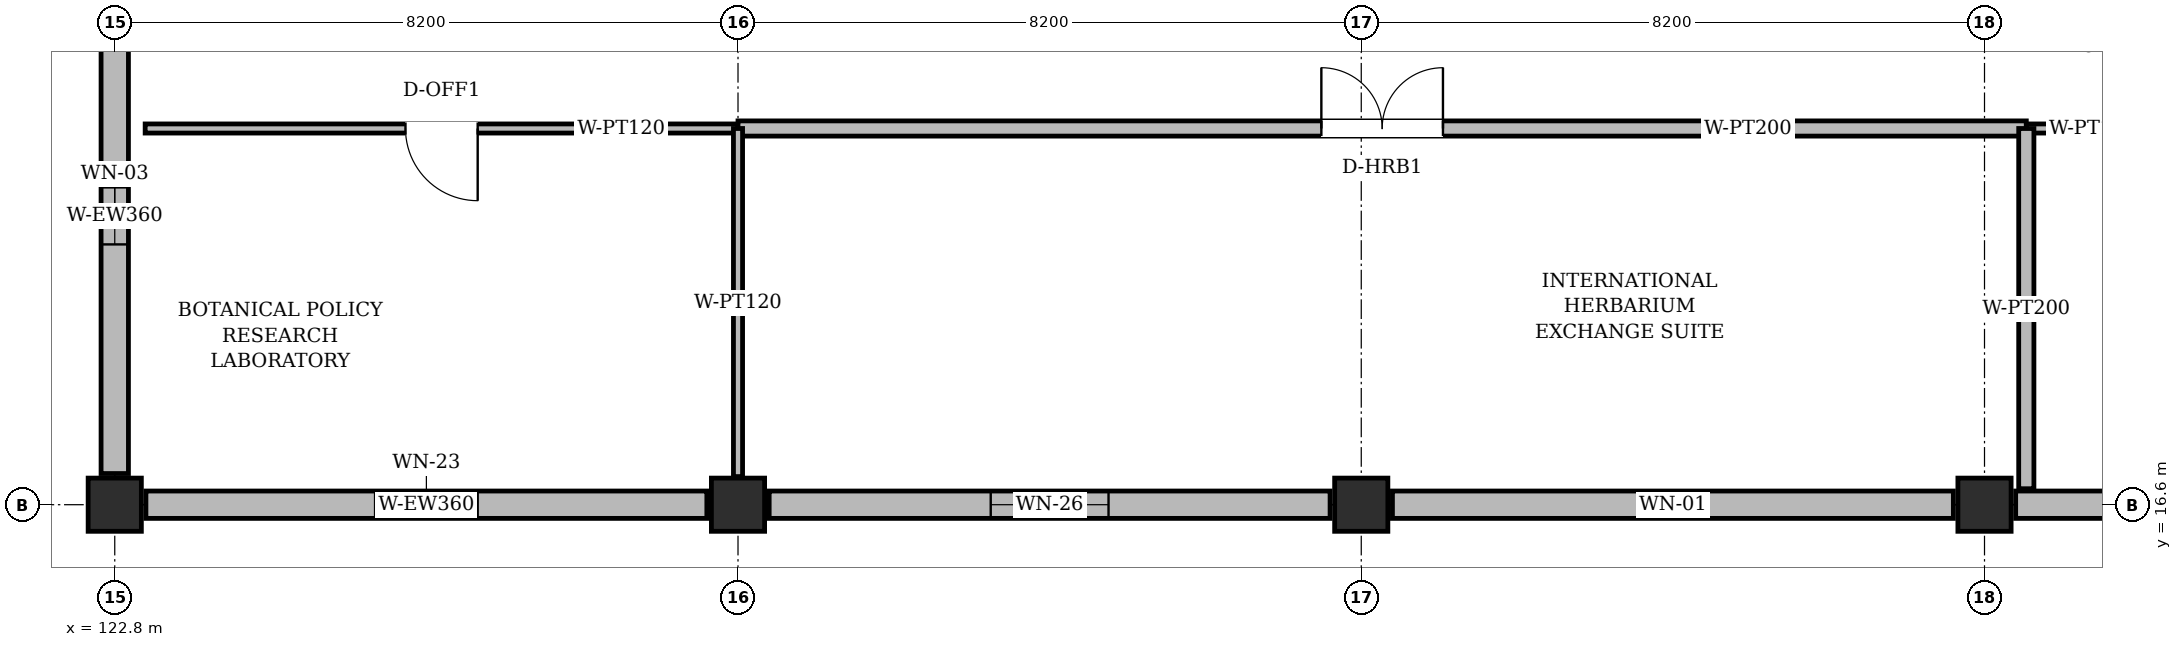
"""IFC4 building model, lengths in metres.
Left out: names, types, materials, properties, quantities, classifications, styles, units other than length and angle.
Written with IfcOpenShell. Run it as: python <this file> out.ifc"""

import sys

from ifc_helpers import new_model, si_unit, direction, frame, frame_2d, origin, origin_2d, place, context, subcontext, project, spatial, rectangle, extrude, element, fill, save


model = new_model("IFC4")
c1 = context("Model", 3, precision=1e-05, world=origin(), true_north=direction((0.0, 1.0)))
c2 = subcontext(c1, "Body", "Model", "MODEL_VIEW")
j1 = project(units=[si_unit("LENGTHUNIT", "METRE"), si_unit("PLANEANGLEUNIT", "RADIAN")], contexts=[c1])
p1 = place(None, origin())
s1 = spatial("IfcSite", under=j1, at=p1, CompositionType="ELEMENT")
p2 = place(p1, origin())
s2 = spatial("IfcBuilding", under=s1, at=p2, CompositionType="ELEMENT")
p3 = place(p2, frame((0.0, 0.0, 61.8)))
s3 = spatial("IfcBuildingStorey", under=s2, at=p3, CompositionType="ELEMENT", Elevation=61.8)
for number, where, z_axis, x_axis in (
    (1, (122.8, 16.6, 0.0), (0.0, 0.0, 1.0), (1.0, 0.0, 0.0)),
    (2, (131.0, 16.6, 0.0), (0.0, 0.0, 1.0), (1.0, 0.0, 0.0)),
    (3, (139.2, 16.6, 0.0), (0.0, 0.0, 1.0), (1.0, 0.0, 0.0)),
    (4, (147.4, 16.6, 0.0), (0.0, 0.0, 1.0), (1.0, 0.0, 0.0)),
):
    element("IfcColumn", number, at=place(p3, frame(where, z_axis=z_axis, x_axis=x_axis)), inside=s3, PredefinedType="COLUMN", context=c2, shape_type="SweptSolid", body=[
        extrude(rectangle(XDim=0.7, YDim=0.7, at=origin_2d()), origin(), (0.0, 0.0, 1.0), 4.145),
    ])
p4 = place(p3, frame((123.21, 16.6, 0.0), z_axis=(0.0, 0.0, 1.0), x_axis=(1.0, 0.0, 0.0)))
e5 = element("IfcWall", 5, at=p4, inside=s3, PredefinedType="SOLIDWALL", context=c2, shape_type="SweptSolid", body=[
    extrude(rectangle(XDim=7.38, YDim=0.36, at=frame_2d((3.69, 0.0))), origin(), (0.0, 0.0, 1.0), 3.53),
])
p5 = place(p4, frame((3.015, 0.0, 0.95)))
e6 = element("IfcOpeningElement", 6, at=p5, cuts=e5, PredefinedType="OPENING", context=c2, shape_type="SweptSolid", body=[
    extrude(rectangle(XDim=1.35, YDim=1.75, at=frame_2d((0.675, 0.875))), frame((0.0, 0.192, 0.0), z_axis=(0.0, -1.0, 0.0), x_axis=(1.0, 0.0, 0.0)), (0.0, 0.0, 1.0), 0.384),
])
p6 = place(p3, frame((131.41, 16.6, 0.0), z_axis=(0.0, 0.0, 1.0), x_axis=(1.0, 0.0, 0.0)))
e7 = element("IfcWall", 7, at=p6, inside=s3, PredefinedType="SOLIDWALL", context=c2, shape_type="SweptSolid", body=[
    extrude(rectangle(XDim=7.38, YDim=0.36, at=frame_2d((3.69, 0.0))), origin(), (0.0, 0.0, 1.0), 3.53),
])
p7 = place(p6, frame((2.915, 0.0, 0.95)))
e8 = element("IfcOpeningElement", 8, at=p7, cuts=e7, PredefinedType="OPENING", context=c2, shape_type="SweptSolid", body=[
    extrude(rectangle(XDim=1.55, YDim=1.5, at=frame_2d((0.775, 0.75))), frame((0.0, 0.192, 0.0), z_axis=(0.0, -1.0, 0.0), x_axis=(1.0, 0.0, 0.0)), (0.0, 0.0, 1.0), 0.384),
])
p8 = place(p3, frame((139.61, 16.6, 0.0), z_axis=(0.0, 0.0, 1.0), x_axis=(1.0, 0.0, 0.0)))
e9 = element("IfcWall", 9, at=p8, inside=s3, PredefinedType="SOLIDWALL", context=c2, shape_type="SweptSolid", body=[
    extrude(rectangle(XDim=7.38, YDim=0.36, at=frame_2d((3.69, 0.0))), origin(), (0.0, 0.0, 1.0), 3.53),
])
p9 = place(p8, frame((3.24, 0.0, 0.95)))
e10 = element("IfcOpeningElement", 10, at=p9, cuts=e9, PredefinedType="OPENING", context=c2, shape_type="SweptSolid", body=[
    extrude(rectangle(XDim=0.9, YDim=2.1, at=frame_2d((0.45, 1.05))), frame((0.0, 0.192, 0.0), z_axis=(0.0, -1.0, 0.0), x_axis=(1.0, 0.0, 0.0)), (0.0, 0.0, 1.0), 0.384),
])
p10 = place(p3, frame((147.81, 16.6, 0.0), z_axis=(0.0, 0.0, 1.0), x_axis=(1.0, 0.0, 0.0)))
e11 = element("IfcWall", 11, at=p10, inside=s3, PredefinedType="SOLIDWALL", context=c2, shape_type="SweptSolid", body=[
    extrude(rectangle(XDim=7.38, YDim=0.36, at=frame_2d((3.69, 0.0))), origin(), (0.0, 0.0, 1.0), 3.53),
])
p11 = place(p10, frame((2.865, 0.0, 0.95)))
e12 = element("IfcOpeningElement", 12, at=p11, cuts=e11, PredefinedType="OPENING", context=c2, shape_type="SweptSolid", body=[
    extrude(rectangle(XDim=1.65, YDim=2.0, at=frame_2d((0.825, 1.0))), frame((0.0, 0.192, 0.0), z_axis=(0.0, -1.0, 0.0), x_axis=(1.0, 0.0, 0.0)), (0.0, 0.0, 1.0), 0.384),
])
p12 = place(p3, frame((122.8, 23.79, 0.0), z_axis=(0.0, 0.0, 1.0), x_axis=(0.0, -1.0, 0.0)))
e13 = element("IfcWall", 13, at=p12, inside=s3, PredefinedType="SOLIDWALL", context=c2, shape_type="SweptSolid", body=[
    extrude(rectangle(XDim=6.78, YDim=0.36, at=frame_2d((3.39, 0.0))), origin(), (0.0, 0.0, 1.0), 3.53),
])
p13 = place(p12, frame((3.015, 0.0, 0.95)))
e14 = element("IfcOpeningElement", 14, at=p13, cuts=e13, PredefinedType="OPENING", context=c2, shape_type="SweptSolid", body=[
    extrude(rectangle(XDim=0.75, YDim=1.8, at=frame_2d((0.375, 0.9))), frame((0.0, 0.192, 0.0), z_axis=(0.0, -1.0, 0.0), x_axis=(1.0, 0.0, 0.0)), (0.0, 0.0, 1.0), 0.384),
])
p14 = place(p3, frame((131.0, 21.55, 0.0), z_axis=(0.0, 0.0, 1.0), x_axis=(-1.0, 0.0, 0.0)))
e15 = element("IfcWall", 15, at=p14, inside=s3, PredefinedType="PARTITIONING", context=c2, shape_type="SweptSolid", body=[
    extrude(rectangle(XDim=7.8, YDim=0.12, at=frame_2d((3.9, 0.0))), origin(), (0.0, 0.0, 1.0), 4.005),
])
p15 = place(p14, frame((3.425, 0.0, 0.0)))
e16 = element("IfcOpeningElement", 16, at=p15, cuts=e15, PredefinedType="OPENING", context=c2, shape_type="SweptSolid", body=[
    extrude(rectangle(XDim=0.95, YDim=2.2, at=frame_2d((0.475, 1.1))), frame((0.0, 0.072, 0.0), z_axis=(0.0, -1.0, 0.0), x_axis=(1.0, 0.0, 0.0)), (0.0, 0.0, 1.0), 0.144),
])
p16 = place(p3, frame((147.95, 21.55, 0.0), z_axis=(0.0, 0.0, 1.0), x_axis=(-1.0, 0.0, 0.0)))
e17 = element("IfcWall", 17, at=p16, inside=s3, PredefinedType="PARTITIONING", context=c2, shape_type="SweptSolid", body=[
    extrude(rectangle(XDim=16.95, YDim=0.2, at=frame_2d((8.475, 0.0))), origin(), (0.0, 0.0, 1.0), 3.685),
])
p17 = place(p16, frame((7.675, 0.0, 0.0)))
e18 = element("IfcOpeningElement", 18, at=p17, cuts=e17, PredefinedType="OPENING", context=c2, shape_type="SweptSolid", body=[
    extrude(rectangle(XDim=1.6, YDim=2.3, at=frame_2d((0.8, 1.15))), frame((0.0, 0.112, 0.0), z_axis=(0.0, -1.0, 0.0), x_axis=(1.0, 0.0, 0.0)), (0.0, 0.0, 1.0), 0.224),
])
p18 = place(p3, frame((149.7, 21.55, 0.0), z_axis=(0.0, 0.0, 1.0), x_axis=(-1.0, 0.0, 0.0)))
e19 = element("IfcWall", 19, at=p18, inside=s3, PredefinedType="PARTITIONING", context=c2, shape_type="SweptSolid", body=[
    extrude(rectangle(XDim=1.75, YDim=0.12, at=frame_2d((0.875, 0.0))), origin(), (0.0, 0.0, 1.0), 3.685),
])
p19 = place(p3, frame((131.0, 21.55, 0.0), z_axis=(0.0, 0.0, 1.0), x_axis=(0.0, -1.0, 0.0)))
e20 = element("IfcWall", 20, at=p19, inside=s3, PredefinedType="PARTITIONING", context=c2, shape_type="SweptSolid", body=[
    extrude(rectangle(XDim=4.58, YDim=0.12, at=frame_2d((2.29, 0.0))), origin(), (0.0, 0.0, 1.0), 3.53),
])
p20 = place(p3, frame((147.95, 21.55, 0.0), z_axis=(0.0, 0.0, 1.0), x_axis=(0.0, -1.0, 0.0)))
e21 = element("IfcWall", 21, at=p20, inside=s3, PredefinedType="PARTITIONING", context=c2, shape_type="SweptSolid", body=[
    extrude(rectangle(XDim=4.74, YDim=0.2, at=frame_2d((2.37, 0.0))), origin(), (0.0, 0.0, 1.0), 4.005),
])
p21 = place(p5, origin())
e22 = element("IfcWindow", 22, at=p21, inside=s3, PartitioningType="SINGLE_PANEL", PredefinedType="WINDOW", context=c2, shape_type="SweptSolid", body=[
    extrude(rectangle(XDim=1.35, YDim=1.75, at=frame_2d((0.675, 0.875))), frame((0.0, 0.03, 0.0), z_axis=(0.0, -1.0, 0.0), x_axis=(1.0, 0.0, 0.0)), (0.0, 0.0, 1.0), 0.06),
])
fill(e6, e22)
p22 = place(p7, origin())
e23 = element("IfcWindow", 23, at=p22, inside=s3, PartitioningType="DOUBLE_PANEL_VERTICAL", PredefinedType="WINDOW", context=c2, shape_type="SweptSolid", body=[
    extrude(rectangle(XDim=1.55, YDim=1.5, at=frame_2d((0.775, 0.75))), frame((0.0, 0.03, 0.0), z_axis=(0.0, -1.0, 0.0), x_axis=(1.0, 0.0, 0.0)), (0.0, 0.0, 1.0), 0.06),
])
fill(e8, e23)
p23 = place(p9, origin())
e24 = element("IfcWindow", 24, at=p23, inside=s3, PartitioningType="SINGLE_PANEL", PredefinedType="WINDOW", context=c2, shape_type="SweptSolid", body=[
    extrude(rectangle(XDim=0.9, YDim=2.1, at=frame_2d((0.45, 1.05))), frame((0.0, 0.03, 0.0), z_axis=(0.0, -1.0, 0.0), x_axis=(1.0, 0.0, 0.0)), (0.0, 0.0, 1.0), 0.06),
])
fill(e10, e24)
p24 = place(p13, origin())
e25 = element("IfcWindow", 25, at=p24, inside=s3, PartitioningType="SINGLE_PANEL", PredefinedType="WINDOW", context=c2, shape_type="SweptSolid", body=[
    extrude(rectangle(XDim=0.75, YDim=1.8, at=frame_2d((0.375, 0.9))), frame((0.0, 0.03, 0.0), z_axis=(0.0, -1.0, 0.0), x_axis=(1.0, 0.0, 0.0)), (0.0, 0.0, 1.0), 0.06),
])
fill(e14, e25)
p25 = place(p15, origin())
e26 = element("IfcDoor", 26, at=p25, inside=s3, OperationType="SINGLE_SWING_LEFT", PredefinedType="DOOR", context=c2, shape_type="SweptSolid", body=[
    extrude(rectangle(XDim=0.95, YDim=2.2, at=frame_2d((0.475, 1.1))), frame((0.0, 0.025, 0.0), z_axis=(0.0, -1.0, 0.0), x_axis=(1.0, 0.0, 0.0)), (0.0, 0.0, 1.0), 0.05),
])
fill(e16, e26)
p26 = place(p17, frame((1.6, 0.0, 0.0), z_axis=(0.0, 0.0, 1.0), x_axis=(-1.0, 0.0, 0.0)))
e27 = element("IfcDoor", 27, at=p26, inside=s3, OperationType="DOUBLE_DOOR_SINGLE_SWING", PredefinedType="DOOR", context=c2, shape_type="SweptSolid", body=[
    extrude(rectangle(XDim=1.6, YDim=2.3, at=frame_2d((0.8, 1.15))), frame((0.0, 0.025, 0.0), z_axis=(0.0, -1.0, 0.0), x_axis=(1.0, 0.0, 0.0)), (0.0, 0.0, 1.0), 0.05),
])
fill(e18, e27)
save(model, sys.argv[1])
